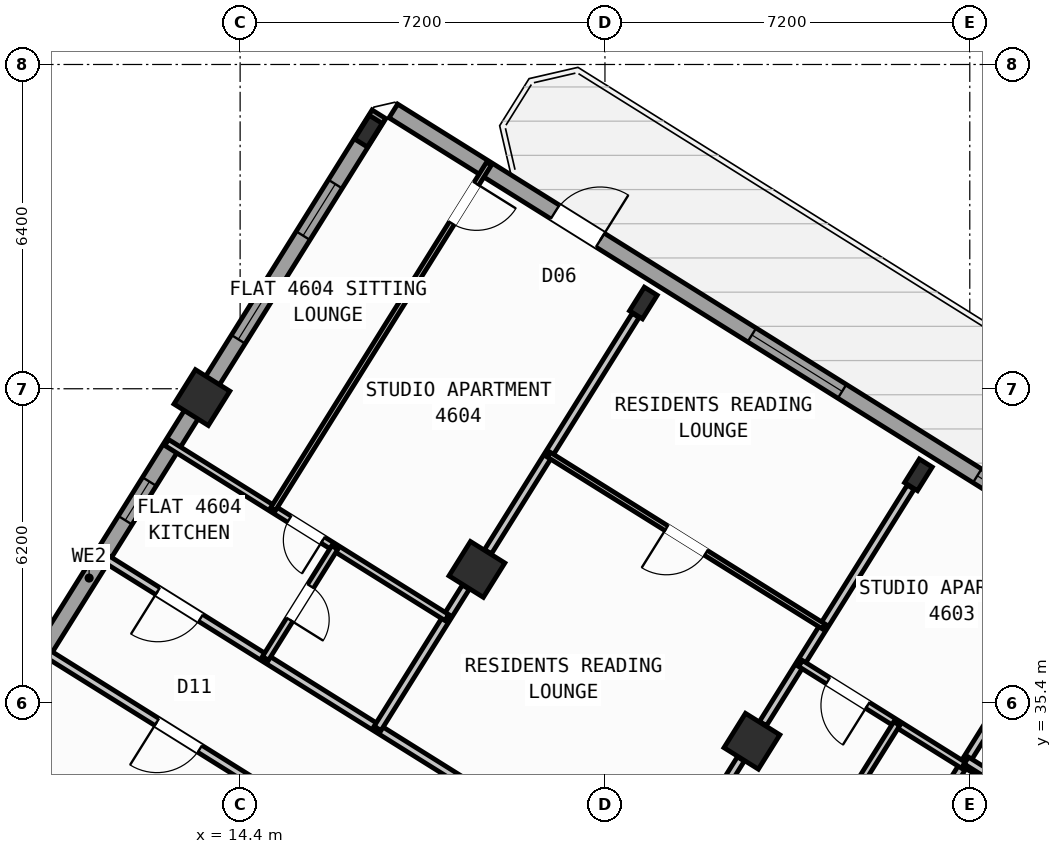
"""IFC4 building model, lengths in metres.
Left out: names, types, materials, properties, quantities, classifications, styles, units other than length and angle.
Written with IfcOpenShell. Run it as: python <this file> out.ifc"""

import sys

from ifc_helpers import new_model, si_unit, direction, frame, frame_2d, origin, origin_2d, place, context, subcontext, project, spatial, rectangle, hollow_rectangle, i_section, extrude, source, transform, mapped, element, fill, save


model = new_model("IFC4")
c1 = context("Model", 3, precision=1e-05, world=origin(), true_north=direction((0.0, 1.0)))
c2 = subcontext(c1, "Body", "Model", "MODEL_VIEW")
j1 = project(units=[si_unit("LENGTHUNIT", "METRE"), si_unit("PLANEANGLEUNIT", "RADIAN")], contexts=[c1])
p1 = place(None, origin())
s1 = spatial("IfcSite", under=j1, at=p1, CompositionType="ELEMENT")
p2 = place(p1, origin())
s2 = spatial("IfcBuilding", under=s1, at=p2, CompositionType="ELEMENT")
p3 = place(p2, frame((0.0, 0.0, 184.2)))
s3 = spatial("IfcBuildingStorey", under=s2, at=p3, CompositionType="ELEMENT", Elevation=184.2)
m1 = source(origin(), c2, "Body", "SweptSolid", [
    extrude(i_section(OverallWidth=0.3, OverallDepth=0.55, WebThickness=0.015, FlangeThickness=0.029, at=origin_2d()), origin(), (0.0, 0.0, 1.0), 3.6),
])
p4 = place(p3, frame((27.786, 39.901, 0.0), z_axis=(0.0, 0.0, 1.0), x_axis=(-0.848048096156, 0.529919264233, 0.0)))
e1 = element("IfcColumn", 1, at=p4, inside=s3, PredefinedType="COLUMN", context=c2, shape_type="MappedRepresentation", body=[
    mapped(m1, transform((0.0, 0.0, 0.0), scale=1.0)),
])
m2 = source(origin(), c2, "Body", "SweptSolid", [
    extrude(hollow_rectangle(XDim=0.8, YDim=0.8, WallThickness=0.032, at=origin_2d()), origin(), (0.0, 0.0, 1.0), 3.6),
])
p5 = place(p3, frame((24.5, 34.643, 0.0), z_axis=(0.0, 0.0, 1.0), x_axis=(-0.848048096156, 0.529919264233, 0.0)))
e2 = element("IfcColumn", 2, at=p5, inside=s3, PredefinedType="COLUMN", context=c2, shape_type="MappedRepresentation", body=[
    mapped(m2, transform((0.0, 0.0, 0.0), scale=1.0)),
])
p6 = place(p3, frame((22.358, 43.292, 0.0), z_axis=(0.0, 0.0, 1.0), x_axis=(-0.848048096156, 0.529919264233, 0.0)))
e3 = element("IfcColumn", 3, at=p6, inside=s3, PredefinedType="COLUMN", context=c2, shape_type="MappedRepresentation", body=[
    mapped(m1, transform((0.0, 0.0, 0.0), scale=1.0)),
])
p7 = place(p3, frame((19.073, 38.034, 0.0), z_axis=(0.0, 0.0, 1.0), x_axis=(-0.848048096156, 0.529919264233, 0.0)))
e4 = element("IfcColumn", 4, at=p7, inside=s3, PredefinedType="COLUMN", context=c2, shape_type="MappedRepresentation", body=[
    mapped(m2, transform((0.0, 0.0, 0.0), scale=1.0)),
])
p8 = place(p3, frame((16.931, 46.684, 0.0), z_axis=(0.0, 0.0, 1.0), x_axis=(-0.848048096156, 0.529919264233, 0.0)))
e5 = element("IfcColumn", 5, at=p8, inside=s3, PredefinedType="COLUMN", context=c2, shape_type="MappedRepresentation", body=[
    mapped(m1, transform((0.0, 0.0, 0.0), scale=1.0)),
])
p9 = place(p3, frame((13.646, 41.426, 0.0), z_axis=(0.0, 0.0, 1.0), x_axis=(-0.848048096156, 0.529919264233, 0.0)))
e6 = element("IfcColumn", 6, at=p9, inside=s3, PredefinedType="COLUMN", context=c2, shape_type="MappedRepresentation", body=[
    mapped(m2, transform((0.0, 0.0, 0.0), scale=1.0)),
])
p10 = place(p3, frame((5.7, 28.71, 0.0), z_axis=(0.0, 0.0, 1.0), x_axis=(0.529923711467, 0.8480453172, 0.0)))
e7 = element("IfcWall", 7, at=p10, inside=s3, PredefinedType="STANDARD", context=c2, shape_type="SweptSolid", body=[
    extrude(rectangle(XDim=21.587, YDim=0.32, at=frame_2d((10.794, 0.0))), origin(), (0.0, 0.0, 1.0), 2.825),
])
p11 = place(p10, frame((1.44, 0.0, 0.95)))
e8 = element("IfcOpeningElement", 8, at=p11, cuts=e7, PredefinedType="OPENING", context=c2, shape_type="SweptSolid", body=[
    extrude(rectangle(XDim=1.2, YDim=1.4, at=frame_2d((0.6, 0.7))), frame((0.0, 0.17, 0.0), z_axis=(0.0, -1.0, 0.0), x_axis=(1.0, 0.0, 0.0)), (0.0, 0.0, 1.0), 0.34),
])
p12 = place(p10, frame((4.545, 0.0, 0.85)))
e9 = element("IfcOpeningElement", 9, at=p12, cuts=e7, PredefinedType="OPENING", context=c2, shape_type="SweptSolid", body=[
    extrude(rectangle(XDim=1.8, YDim=1.5, at=frame_2d((0.9, 0.75))), frame((0.0, 0.17, 0.0), z_axis=(0.0, -1.0, 0.0), x_axis=(1.0, 0.0, 0.0)), (0.0, 0.0, 1.0), 0.34),
])
p13 = place(p10, frame((12.139, 0.0, 1.0)))
e10 = element("IfcOpeningElement", 10, at=p13, cuts=e7, PredefinedType="OPENING", context=c2, shape_type="SweptSolid", body=[
    extrude(rectangle(XDim=0.9, YDim=1.25, at=frame_2d((0.45, 0.625))), frame((0.0, 0.17, 0.0), z_axis=(0.0, -1.0, 0.0), x_axis=(1.0, 0.0, 0.0)), (0.0, 0.0, 1.0), 0.34),
])
p14 = place(p10, frame((16.35, 0.0, 0.95)))
e11 = element("IfcOpeningElement", 11, at=p14, cuts=e7, PredefinedType="OPENING", context=c2, shape_type="SweptSolid", body=[
    extrude(rectangle(XDim=1.2, YDim=1.4, at=frame_2d((0.6, 0.7))), frame((0.0, 0.17, 0.0), z_axis=(0.0, -1.0, 0.0), x_axis=(1.0, 0.0, 0.0)), (0.0, 0.0, 1.0), 0.34),
])
p15 = place(p10, frame((18.762, 0.0, 0.95)))
e12 = element("IfcOpeningElement", 12, at=p15, cuts=e7, PredefinedType="OPENING", context=c2, shape_type="SweptSolid", body=[
    extrude(rectangle(XDim=1.2, YDim=1.4, at=frame_2d((0.6, 0.7))), frame((0.0, 0.17, 0.0), z_axis=(0.0, -1.0, 0.0), x_axis=(1.0, 0.0, 0.0)), (0.0, 0.0, 1.0), 0.34),
])
p16 = place(p3, frame((17.424, 47.083, 0.0), z_axis=(0.0, 0.0, 1.0), x_axis=(0.848049927979, -0.529916332693, 0.0)))
e13 = element("IfcWall", 13, at=p16, inside=s3, PredefinedType="STANDARD", context=c2, shape_type="SweptSolid", body=[
    extrude(rectangle(XDim=29.223, YDim=0.32, at=frame_2d((14.612, 0.0))), origin(), (0.0, 0.0, 1.0), 3.35),
])
p17 = place(p16, frame((3.764, 0.0, 0.0)))
e14 = element("IfcOpeningElement", 14, at=p17, cuts=e13, PredefinedType="OPENING", context=c2, shape_type="SweptSolid", body=[
    extrude(rectangle(XDim=1.05, YDim=2.15, at=frame_2d((0.525, 1.075))), frame((0.0, 0.17, 0.0), z_axis=(0.0, -1.0, 0.0), x_axis=(1.0, 0.0, 0.0)), (0.0, 0.0, 1.0), 0.34),
])
p18 = place(p16, frame((8.344, 0.0, 0.8)))
e15 = element("IfcOpeningElement", 15, at=p18, cuts=e13, PredefinedType="OPENING", context=c2, shape_type="SweptSolid", body=[
    extrude(rectangle(XDim=2.1, YDim=1.55, at=frame_2d((1.05, 0.775))), frame((0.0, 0.17, 0.0), z_axis=(0.0, -1.0, 0.0), x_axis=(1.0, 0.0, 0.0)), (0.0, 0.0, 1.0), 0.34),
])
p19 = place(p16, frame((13.589, 0.0, 0.85)))
e16 = element("IfcOpeningElement", 16, at=p19, cuts=e13, PredefinedType="OPENING", context=c2, shape_type="SweptSolid", body=[
    extrude(rectangle(XDim=1.8, YDim=1.5, at=frame_2d((0.9, 0.75))), frame((0.0, 0.17, 0.0), z_axis=(0.0, -1.0, 0.0), x_axis=(1.0, 0.0, 0.0)), (0.0, 0.0, 1.0), 0.34),
])
p20 = place(p16, frame((17.104, 0.0, 0.95)))
e17 = element("IfcOpeningElement", 17, at=p20, cuts=e13, PredefinedType="OPENING", context=c2, shape_type="SweptSolid", body=[
    extrude(rectangle(XDim=1.2, YDim=1.4, at=frame_2d((0.6, 0.7))), frame((0.0, 0.17, 0.0), z_axis=(0.0, -1.0, 0.0), x_axis=(1.0, 0.0, 0.0)), (0.0, 0.0, 1.0), 0.34),
])
p21 = place(p16, frame((21.214, 0.0, 0.95)))
e18 = element("IfcOpeningElement", 18, at=p21, cuts=e13, PredefinedType="OPENING", context=c2, shape_type="SweptSolid", body=[
    extrude(rectangle(XDim=1.2, YDim=1.4, at=frame_2d((0.6, 0.7))), frame((0.0, 0.17, 0.0), z_axis=(0.0, -1.0, 0.0), x_axis=(1.0, 0.0, 0.0)), (0.0, 0.0, 1.0), 0.34),
])
p22 = place(p16, frame((25.853, 0.0, 0.95)))
e19 = element("IfcOpeningElement", 19, at=p22, cuts=e13, PredefinedType="OPENING", context=c2, shape_type="SweptSolid", body=[
    extrude(rectangle(XDim=1.2, YDim=1.4, at=frame_2d((0.6, 0.7))), frame((0.0, 0.17, 0.0), z_axis=(0.0, -1.0, 0.0), x_axis=(1.0, 0.0, 0.0)), (0.0, 0.0, 1.0), 0.34),
])
p23 = place(p3, frame((30.914, 32.829, 0.0), z_axis=(0.0, 0.0, 1.0), x_axis=(-0.848008813643, 0.529982124211, 0.0)))
e20 = element("IfcWall", 20, at=p23, inside=s3, PredefinedType="PARTITIONING", context=c2, shape_type="SweptSolid", body=[
    extrude(rectangle(XDim=2.61, YDim=0.16, at=frame_2d((1.305, 0.0))), origin(), (0.0, 0.0, 1.0), 3.34),
])
p24 = place(p3, frame((31.239, 38.274, 0.0), z_axis=(0.0, 0.0, 1.0), x_axis=(-0.529914125013, -0.848051307476, 0.0)))
e21 = element("IfcWall", 21, at=p24, inside=s3, PredefinedType="PARTITIONING", context=c2, shape_type="SweptSolid", body=[
    extrude(rectangle(XDim=10.35, YDim=0.16, at=frame_2d((5.175, 0.0))), origin(), (0.0, 0.0, 1.0), 3.34),
])
p25 = place(p3, frame((25.754, 29.497, 0.0), z_axis=(0.0, 0.0, 1.0), x_axis=(-0.848045850158, 0.529922858565, 0.0)))
e22 = element("IfcWall", 22, at=p25, inside=s3, PredefinedType="PARTITIONING", context=c2, shape_type="SweptSolid", body=[
    extrude(rectangle(XDim=16.73, YDim=0.16, at=frame_2d((8.365, 0.0))), origin(), (0.0, 0.0, 1.0), 3.34),
])
p26 = place(p25, frame((2.22, 0.0, 0.0)))
e23 = element("IfcOpeningElement", 23, at=p26, cuts=e22, PredefinedType="OPENING", context=c2, shape_type="SweptSolid", body=[
    extrude(rectangle(XDim=0.86, YDim=2.05, at=frame_2d((0.43, 1.025))), frame((0.0, 0.09, 0.0), z_axis=(0.0, -1.0, 0.0), x_axis=(1.0, 0.0, 0.0)), (0.0, 0.0, 1.0), 0.18),
])
p27 = place(p25, frame((6.49, 0.0, 0.0)))
e24 = element("IfcOpeningElement", 24, at=p27, cuts=e22, PredefinedType="OPENING", context=c2, shape_type="SweptSolid", body=[
    extrude(rectangle(XDim=1.0, YDim=2.1, at=frame_2d((0.5, 1.05))), frame((0.0, 0.09, 0.0), z_axis=(0.0, -1.0, 0.0), x_axis=(1.0, 0.0, 0.0)), (0.0, 0.0, 1.0), 0.18),
])
p28 = place(p25, frame((14.304, 0.0, 0.0)))
e25 = element("IfcOpeningElement", 25, at=p28, cuts=e22, PredefinedType="OPENING", context=c2, shape_type="SweptSolid", body=[
    extrude(rectangle(XDim=1.0, YDim=2.1, at=frame_2d((0.5, 1.05))), frame((0.0, 0.09, 0.0), z_axis=(0.0, -1.0, 0.0), x_axis=(1.0, 0.0, 0.0)), (0.0, 0.0, 1.0), 0.18),
])
p29 = place(p3, frame((24.588, 27.631, 0.0), z_axis=(0.0, 0.0, 1.0), x_axis=(-0.848041752158, 0.529929416617, 0.0)))
e26 = element("IfcWall", 26, at=p29, inside=s3, PredefinedType="PARTITIONING", context=c2, shape_type="SweptSolid", body=[
    extrude(rectangle(XDim=16.73, YDim=0.16, at=frame_2d((8.365, 0.0))), origin(), (0.0, 0.0, 1.0), 3.34),
])
p30 = place(p29, frame((2.22, 0.0, 0.0)))
e27 = element("IfcOpeningElement", 27, at=p30, cuts=e26, PredefinedType="OPENING", context=c2, shape_type="SweptSolid", body=[
    extrude(rectangle(XDim=0.86, YDim=2.05, at=frame_2d((0.43, 1.025))), frame((0.0, 0.09, 0.0), z_axis=(0.0, -1.0, 0.0), x_axis=(1.0, 0.0, 0.0)), (0.0, 0.0, 1.0), 0.18),
])
p31 = place(p29, frame((7.82, 0.0, 0.0)))
e28 = element("IfcOpeningElement", 28, at=p31, cuts=e26, PredefinedType="OPENING", context=c2, shape_type="SweptSolid", body=[
    extrude(rectangle(XDim=1.0, YDim=2.1, at=frame_2d((0.5, 1.05))), frame((0.0, 0.09, 0.0), z_axis=(0.0, -1.0, 0.0), x_axis=(1.0, 0.0, 0.0)), (0.0, 0.0, 1.0), 0.18),
])
p32 = place(p29, frame((12.95, 0.0, 0.0)))
e29 = element("IfcOpeningElement", 29, at=p32, cuts=e26, PredefinedType="OPENING", context=c2, shape_type="SweptSolid", body=[
    extrude(rectangle(XDim=1.0, YDim=2.1, at=frame_2d((0.5, 1.05))), frame((0.0, 0.09, 0.0), z_axis=(0.0, -1.0, 0.0), x_axis=(1.0, 0.0, 0.0)), (0.0, 0.0, 1.0), 0.18),
])
p33 = place(p3, frame((27.634, 39.657, 0.0), z_axis=(0.0, 0.0, 1.0), x_axis=(-0.529899205623, -0.848060629837, 0.0)))
e30 = element("IfcWall", 30, at=p33, inside=s3, PredefinedType="PARTITIONING", context=c2, shape_type="SweptSolid", body=[
    extrude(rectangle(XDim=5.501, YDim=0.16, at=frame_2d((2.75, 0.0))), origin(), (0.0, 0.0, 1.0), 2.825),
])
p34 = place(p3, frame((24.282, 34.293, 0.0), z_axis=(0.0, 0.0, 1.0), x_axis=(-0.529938869374, -0.84803584519, 0.0)))
e31 = element("IfcWall", 31, at=p34, inside=s3, PredefinedType="PARTITIONING", context=c2, shape_type="SweptSolid", body=[
    extrude(rectangle(XDim=3.288, YDim=0.16, at=frame_2d((1.644, 0.0))), origin(), (0.0, 0.0, 1.0), 2.825),
])
p35 = place(p3, frame((28.674, 34.169, 0.0), z_axis=(0.0, 0.0, 1.0), x_axis=(-0.848059820872, 0.529900500304, 0.0)))
e32 = element("IfcWall", 32, at=p35, inside=s3, PredefinedType="PLUMBINGWALL", context=c2, shape_type="SweptSolid", body=[
    extrude(rectangle(XDim=3.79, YDim=0.14, at=frame_2d((1.895, 0.0))), origin(), (0.0, 0.0, 1.0), 3.34),
])
p36 = place(p35, frame((2.23, 0.0, 0.0)))
e33 = element("IfcOpeningElement", 33, at=p36, cuts=e32, PredefinedType="OPENING", context=c2, shape_type="SweptSolid", body=[
    extrude(rectangle(XDim=0.92, YDim=2.08, at=frame_2d((0.46, 1.04))), frame((0.0, 0.08, 0.0), z_axis=(0.0, -1.0, 0.0), x_axis=(1.0, 0.0, 0.0)), (0.0, 0.0, 1.0), 0.16),
])
p37 = place(p3, frame((27.359, 34.991, 0.0), z_axis=(0.0, 0.0, 1.0), x_axis=(-0.529907329021, -0.848055553988, 0.0)))
e34 = element("IfcWall", 34, at=p37, inside=s3, PredefinedType="PLUMBINGWALL", context=c2, shape_type="SweptSolid", body=[
    extrude(rectangle(XDim=5.51, YDim=0.14, at=frame_2d((2.755, 0.0))), origin(), (0.0, 0.0, 1.0), 2.995),
])
p38 = place(p37, frame((2.365, 0.0, 0.0)))
e35 = element("IfcOpeningElement", 35, at=p38, cuts=e34, PredefinedType="OPENING", context=c2, shape_type="SweptSolid", body=[
    extrude(rectangle(XDim=0.78, YDim=2.05, at=frame_2d((0.39, 1.025))), frame((0.0, 0.08, 0.0), z_axis=(0.0, -1.0, 0.0), x_axis=(1.0, 0.0, 0.0)), (0.0, 0.0, 1.0), 0.16),
])
p39 = place(p3, frame((22.206, 43.049, 0.0), z_axis=(0.0, 0.0, 1.0), x_axis=(-0.529919150083, -0.848048167486, 0.0)))
e36 = element("IfcWall", 36, at=p39, inside=s3, PredefinedType="PARTITIONING", context=c2, shape_type="SweptSolid", body=[
    extrude(rectangle(XDim=5.501, YDim=0.16, at=frame_2d((2.75, 0.0))), origin(), (0.0, 0.0, 1.0), 2.825),
])
p40 = place(p3, frame((18.854, 37.685, 0.0), z_axis=(0.0, 0.0, 1.0), x_axis=(-0.529885466561, -0.848069214349, 0.0)))
e37 = element("IfcWall", 37, at=p40, inside=s3, PredefinedType="PARTITIONING", context=c2, shape_type="SweptSolid", body=[
    extrude(rectangle(XDim=3.288, YDim=0.16, at=frame_2d((1.644, 0.0))), origin(), (0.0, 0.0, 1.0), 2.825),
])
p41 = place(p3, frame((25.916, 36.909, 0.0), z_axis=(0.0, 0.0, 1.0), x_axis=(-0.848056163074, 0.529906354247, 0.0)))
e38 = element("IfcWall", 38, at=p41, inside=s3, PredefinedType="PARTITIONING", context=c2, shape_type="SweptSolid", body=[
    extrude(rectangle(XDim=6.4, YDim=0.11, at=frame_2d((3.2, 0.0))), origin(), (0.0, 0.0, 1.0), 3.34),
])
p42 = place(p41, frame((2.74, 0.0, 0.0)))
e39 = element("IfcOpeningElement", 39, at=p42, cuts=e38, PredefinedType="OPENING", context=c2, shape_type="SweptSolid", body=[
    extrude(rectangle(XDim=0.92, YDim=2.08, at=frame_2d((0.46, 1.04))), frame((0.0, 0.065, 0.0), z_axis=(0.0, -1.0, 0.0), x_axis=(1.0, 0.0, 0.0)), (0.0, 0.0, 1.0), 0.13),
])
p43 = place(p3, frame((18.479, 37.084, 0.0), z_axis=(0.0, 0.0, 1.0), x_axis=(-0.848048787466, 0.529918157905, 0.0)))
e40 = element("IfcWall", 40, at=p43, inside=s3, PredefinedType="PLUMBINGWALL", context=c2, shape_type="SweptSolid", body=[
    extrude(rectangle(XDim=6.52, YDim=0.14, at=frame_2d((3.26, 0.0))), origin(), (0.0, 0.0, 1.0), 3.34),
])
p44 = place(p43, frame((2.885, 0.0, 0.0)))
e41 = element("IfcOpeningElement", 41, at=p44, cuts=e40, PredefinedType="OPENING", context=c2, shape_type="SweptSolid", body=[
    extrude(rectangle(XDim=0.78, YDim=2.05, at=frame_2d((0.39, 1.025))), frame((0.0, 0.08, 0.0), z_axis=(0.0, -1.0, 0.0), x_axis=(1.0, 0.0, 0.0)), (0.0, 0.0, 1.0), 0.16),
])
p45 = place(p3, frame((16.268, 38.467, 0.0), z_axis=(0.0, 0.0, 1.0), x_axis=(-0.529913878929, -0.848051461244, 0.0)))
e42 = element("IfcWall", 42, at=p45, inside=s3, PredefinedType="PLUMBINGWALL", context=c2, shape_type="SweptSolid", body=[
    extrude(rectangle(XDim=2.58, YDim=0.14, at=frame_2d((1.29, 0.0))), origin(), (0.0, 0.0, 1.0), 3.34),
])
p46 = place(p45, frame((0.9, 0.0, 0.0)))
e43 = element("IfcOpeningElement", 43, at=p46, cuts=e42, PredefinedType="OPENING", context=c2, shape_type="SweptSolid", body=[
    extrude(rectangle(XDim=0.78, YDim=2.05, at=frame_2d((0.39, 1.025))), frame((0.0, 0.08, 0.0), z_axis=(0.0, -1.0, 0.0), x_axis=(1.0, 0.0, 0.0)), (0.0, 0.0, 1.0), 0.16),
])
p47 = place(p3, frame((19.312, 46.045, 0.0), z_axis=(0.0, 0.0, 1.0), x_axis=(-0.529933431478, -0.848039243315, 0.0)))
e44 = element("IfcWall", 44, at=p47, inside=s3, PredefinedType="PARTITIONING", context=c2, shape_type="SweptSolid", body=[
    extrude(rectangle(XDim=8.04, YDim=0.11, at=frame_2d((4.02, 0.0))), origin(), (0.0, 0.0, 1.0), 2.995),
])
p48 = place(p47, frame((0.47, 0.0, 0.0)))
e45 = element("IfcOpeningElement", 45, at=p48, cuts=e44, PredefinedType="OPENING", context=c2, shape_type="SweptSolid", body=[
    extrude(rectangle(XDim=0.92, YDim=2.08, at=frame_2d((0.46, 1.04))), frame((0.0, 0.065, 0.0), z_axis=(0.0, -1.0, 0.0), x_axis=(1.0, 0.0, 0.0)), (0.0, 0.0, 1.0), 0.13),
])
p49 = place(p3, frame((41.936, 26.012, 0.0), z_axis=(0.0, 0.0, 1.0), x_axis=(-0.848051154596, 0.529914369676, 0.0)))
e46 = element("IfcWall", 46, at=p49, inside=s3, PredefinedType="PARTITIONING", context=c2, shape_type="SweptSolid", body=[
    extrude(rectangle(XDim=15.57, YDim=0.16, at=frame_2d((7.785, 0.0))), origin(), (0.0, 0.0, 1.0), 3.34),
])
p50 = place(p49, frame((10.83, 0.0, 0.0)))
e47 = element("IfcOpeningElement", 47, at=p50, cuts=e46, PredefinedType="OPENING", context=c2, shape_type="SweptSolid", body=[
    extrude(rectangle(XDim=1.0, YDim=2.1, at=frame_2d((0.5, 1.05))), frame((0.0, 0.09, 0.0), z_axis=(0.0, -1.0, 0.0), x_axis=(1.0, 0.0, 0.0)), (0.0, 0.0, 1.0), 0.18),
])
m3 = source(origin(), c2, "Body", "SweptSolid", [
    extrude(rectangle(XDim=1.05, YDim=2.15, at=frame_2d((0.525, 1.075))), frame((0.0, 0.025, 0.0), z_axis=(0.0, -1.0, 0.0), x_axis=(1.0, 0.0, 0.0)), (0.0, 0.0, 1.0), 0.05),
])
p51 = place(p17, origin())
e48 = element("IfcDoor", 48, at=p51, inside=s3, OperationType="SINGLE_SWING_RIGHT", PredefinedType="DOOR", context=c2, shape_type="MappedRepresentation", body=[
    mapped(m3, transform((0.0, 0.0, 0.0), scale=1.0)),
])
fill(e14, e48)
m4 = source(origin(), c2, "Body", "SweptSolid", [
    extrude(rectangle(XDim=0.9, YDim=1.25, at=frame_2d((0.45, 0.625))), frame((0.0, 0.03, 0.0), z_axis=(0.0, -1.0, 0.0), x_axis=(1.0, 0.0, 0.0)), (0.0, 0.0, 1.0), 0.06),
])
p52 = place(p13, origin())
e49 = element("IfcWindow", 49, at=p52, inside=s3, PartitioningType="SINGLE_PANEL", PredefinedType="WINDOW", context=c2, shape_type="MappedRepresentation", body=[
    mapped(m4, transform((0.0, 0.0, 0.0), scale=1.0)),
])
fill(e10, e49)
m5 = source(origin(), c2, "Body", "SweptSolid", [
    extrude(rectangle(XDim=1.2, YDim=1.4, at=frame_2d((0.6, 0.7))), frame((0.0, 0.03, 0.0), z_axis=(0.0, -1.0, 0.0), x_axis=(1.0, 0.0, 0.0)), (0.0, 0.0, 1.0), 0.06),
])
p53 = place(p14, origin())
e50 = element("IfcWindow", 50, at=p53, inside=s3, PartitioningType="SINGLE_PANEL", PredefinedType="WINDOW", context=c2, shape_type="MappedRepresentation", body=[
    mapped(m5, transform((0.0, 0.0, 0.0), scale=1.0)),
])
fill(e11, e50)
p54 = place(p15, origin())
e51 = element("IfcWindow", 51, at=p54, inside=s3, PartitioningType="SINGLE_PANEL", PredefinedType="WINDOW", context=c2, shape_type="MappedRepresentation", body=[
    mapped(m5, transform((0.0, 0.0, 0.0), scale=1.0)),
])
fill(e12, e51)
m6 = source(origin(), c2, "Body", "SweptSolid", [
    extrude(rectangle(XDim=2.1, YDim=1.55, at=frame_2d((1.05, 0.775))), frame((0.0, 0.03, 0.0), z_axis=(0.0, -1.0, 0.0), x_axis=(1.0, 0.0, 0.0)), (0.0, 0.0, 1.0), 0.06),
])
p55 = place(p18, origin())
e52 = element("IfcWindow", 52, at=p55, inside=s3, PartitioningType="SINGLE_PANEL", PredefinedType="WINDOW", context=c2, shape_type="MappedRepresentation", body=[
    mapped(m6, transform((0.0, 0.0, 0.0), scale=1.0)),
])
fill(e15, e52)
m7 = source(origin(), c2, "Body", "SweptSolid", [
    extrude(rectangle(XDim=1.8, YDim=1.5, at=frame_2d((0.9, 0.75))), frame((0.0, 0.03, 0.0), z_axis=(0.0, -1.0, 0.0), x_axis=(1.0, 0.0, 0.0)), (0.0, 0.0, 1.0), 0.06),
])
p56 = place(p19, origin())
e53 = element("IfcWindow", 53, at=p56, inside=s3, PartitioningType="SINGLE_PANEL", PredefinedType="WINDOW", context=c2, shape_type="MappedRepresentation", body=[
    mapped(m7, transform((0.0, 0.0, 0.0), scale=1.0)),
])
fill(e16, e53)
m8 = source(origin(), c2, "Body", "SweptSolid", [
    extrude(rectangle(XDim=1.0, YDim=2.1, at=frame_2d((0.5, 1.05))), frame((0.0, 0.025, 0.0), z_axis=(0.0, -1.0, 0.0), x_axis=(1.0, 0.0, 0.0)), (0.0, 0.0, 1.0), 0.05),
])
p57 = place(p32, origin())
e54 = element("IfcDoor", 54, at=p57, inside=s3, OperationType="SINGLE_SWING_RIGHT", PredefinedType="DOOR", context=c2, shape_type="MappedRepresentation", body=[
    mapped(m8, transform((0.0, 0.0, 0.0), scale=1.0)),
])
fill(e29, e54)
m9 = source(origin(), c2, "Body", "SweptSolid", [
    extrude(rectangle(XDim=0.92, YDim=2.08, at=frame_2d((0.46, 1.04))), frame((0.0, 0.025, 0.0), z_axis=(0.0, -1.0, 0.0), x_axis=(1.0, 0.0, 0.0)), (0.0, 0.0, 1.0), 0.05),
])
p58 = place(p36, origin())
e55 = element("IfcDoor", 55, at=p58, inside=s3, OperationType="SINGLE_SWING_LEFT", PredefinedType="DOOR", context=c2, shape_type="MappedRepresentation", body=[
    mapped(m9, transform((0.0, 0.0, 0.0), scale=1.0)),
])
fill(e33, e55)
p59 = place(p42, origin())
e56 = element("IfcDoor", 56, at=p59, inside=s3, OperationType="SINGLE_SWING_RIGHT", PredefinedType="DOOR", context=c2, shape_type="MappedRepresentation", body=[
    mapped(m9, transform((0.0, 0.0, 0.0), scale=1.0)),
])
fill(e39, e56)
p60 = place(p48, origin())
e57 = element("IfcDoor", 57, at=p60, inside=s3, OperationType="SINGLE_SWING_LEFT", PredefinedType="DOOR", context=c2, shape_type="MappedRepresentation", body=[
    mapped(m9, transform((0.0, 0.0, 0.0), scale=1.0)),
])
fill(e45, e57)
p61 = place(p28, origin())
e58 = element("IfcDoor", 58, at=p61, inside=s3, OperationType="SINGLE_SWING_RIGHT", PredefinedType="DOOR", context=c2, shape_type="MappedRepresentation", body=[
    mapped(m8, transform((0.0, 0.0, 0.0), scale=1.0)),
])
fill(e25, e58)
m10 = source(origin(), c2, "Body", "SweptSolid", [
    extrude(rectangle(XDim=0.78, YDim=2.05, at=frame_2d((0.39, 1.025))), frame((0.0, 0.025, 0.0), z_axis=(0.0, -1.0, 0.0), x_axis=(1.0, 0.0, 0.0)), (0.0, 0.0, 1.0), 0.05),
])
p62 = place(p44, origin())
e59 = element("IfcDoor", 59, at=p62, inside=s3, OperationType="SINGLE_SWING_LEFT", PredefinedType="DOOR", context=c2, shape_type="MappedRepresentation", body=[
    mapped(m10, transform((0.0, 0.0, 0.0), scale=1.0)),
])
fill(e41, e59)
p63 = place(p46, origin())
e60 = element("IfcDoor", 60, at=p63, inside=s3, OperationType="SINGLE_SWING_RIGHT", PredefinedType="DOOR", context=c2, shape_type="MappedRepresentation", body=[
    mapped(m10, transform((0.0, 0.0, 0.0), scale=1.0)),
])
fill(e43, e60)
save(model, sys.argv[1])
